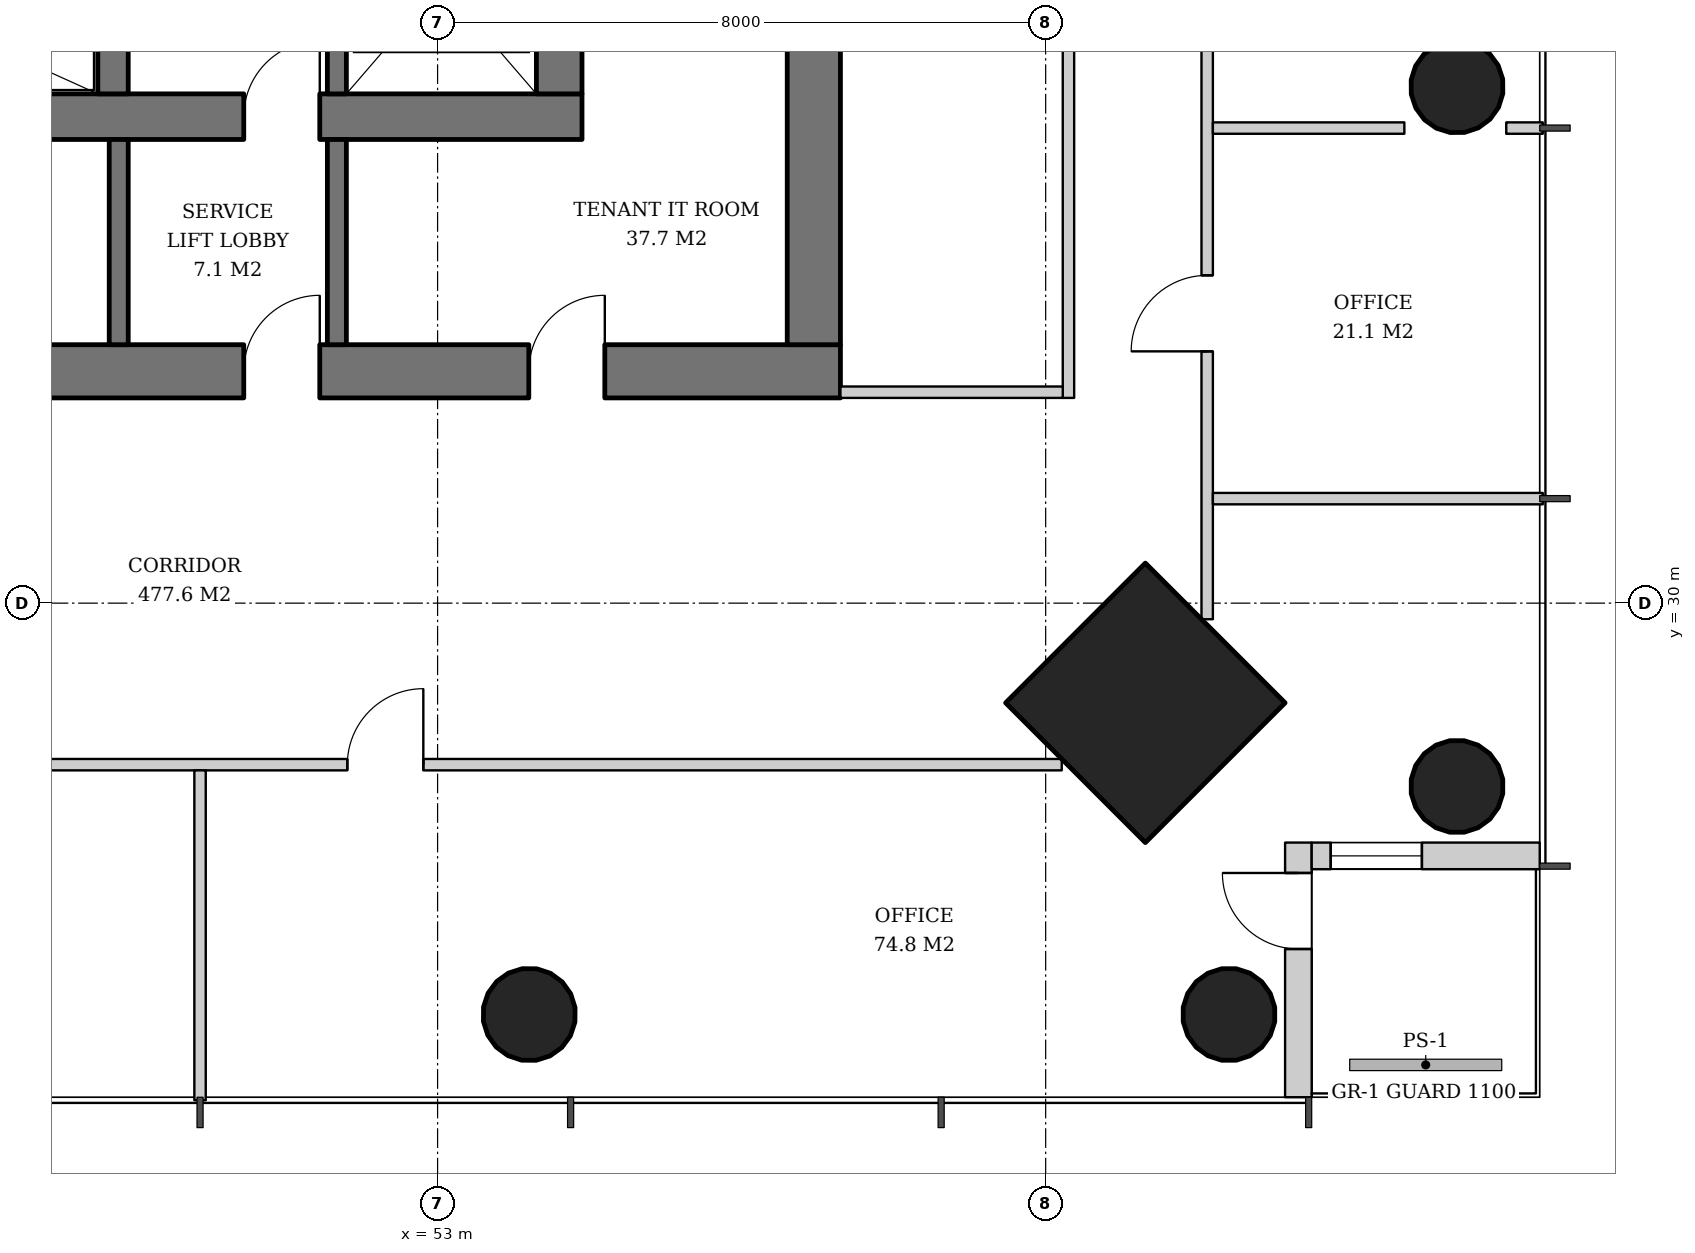
"""IFC4 building model, lengths in metres.
Left out: names, types, materials, properties, quantities, classifications, styles, units other than length and angle.
Written with IfcOpenShell. Run it as: python <this file> out.ifc"""

import sys

from ifc_helpers import new_model, si_unit, direction, frame, frame_2d, origin, origin_2d, place, context, subcontext, project, spatial, rectangle, hollow_circle, extrude, element, fill, save


model = new_model("IFC4")
c1 = context("Model", 3, precision=1e-05, world=origin(), true_north=direction((0.0, 1.0)))
c2 = subcontext(c1, "Body", "Model", "MODEL_VIEW")
j1 = project(units=[si_unit("LENGTHUNIT", "METRE"), si_unit("PLANEANGLEUNIT", "RADIAN")], contexts=[c1])
p1 = place(None, origin())
s1 = spatial("IfcSite", under=j1, at=p1, CompositionType="ELEMENT")
p2 = place(p1, origin())
s2 = spatial("IfcBuilding", under=s1, at=p2, CompositionType="ELEMENT")
p3 = place(p2, frame((0.0, 0.0, 100.8)))
s3 = spatial("IfcBuildingStorey", under=s2, at=p3, CompositionType="ELEMENT", Elevation=100.8)
p4 = place(p3, frame((66.45, 27.55, 0.0), z_axis=(-0.031898107953, 0.031898107953, 0.998981992539), x_axis=(-0.707106781187, -0.707106781187, 0.0)))
e1 = element("IfcColumn", 1, at=p4, inside=s3, PredefinedType="COLUMN", context=c2, shape_type="SweptSolid", body=[
    extrude(hollow_circle(Radius=0.61, WallThickness=0.04, at=origin_2d()), origin(), (0.0, 0.0, 1.0), 3.804),
])
p5 = place(p3, frame((66.45, 36.775, 0.0), z_axis=(-0.031910269556, 0.015987237665, 0.999362868496), x_axis=(-0.447933021895, -0.894067115991, 0.0)))
e2 = element("IfcColumn", 2, at=p5, inside=s3, PredefinedType="COLUMN", context=c2, shape_type="SweptSolid", body=[
    extrude(hollow_circle(Radius=0.61, WallThickness=0.04, at=origin_2d()), origin(), (0.0, 0.0, 1.0), 3.802),
])
p6 = place(p3, frame((62.35, 28.65, 0.0), z_axis=(-0.031962158256, 0.031962158256, 0.998977898093), x_axis=(-0.707106781187, -0.707106781187, 0.0)))
e3 = element("IfcColumn", 3, at=p6, inside=s3, PredefinedType="COLUMN", context=c2, shape_type="SweptSolid", body=[
    extrude(rectangle(XDim=2.6, YDim=2.6, at=origin_2d()), origin(), (0.0, 0.0, 1.0), 3.804),
])
p7 = place(p3, frame((63.45, 24.55, 0.0), z_axis=(-0.031898107953, 0.031898107953, 0.998981992539), x_axis=(-0.707106781187, -0.707106781187, 0.0)))
e4 = element("IfcColumn", 4, at=p7, inside=s3, PredefinedType="COLUMN", context=c2, shape_type="SweptSolid", body=[
    extrude(hollow_circle(Radius=0.61, WallThickness=0.04, at=origin_2d()), origin(), (0.0, 0.0, 1.0), 3.804),
])
p8 = place(p3, frame((54.225, 24.55, 0.0), z_axis=(-0.015987237665, 0.031910269556, 0.999362868496), x_axis=(-0.894067115991, -0.447933021895, 0.0)))
e5 = element("IfcColumn", 5, at=p8, inside=s3, PredefinedType="COLUMN", context=c2, shape_type="SweptSolid", body=[
    extrude(hollow_circle(Radius=0.61, WallThickness=0.04, at=origin_2d()), origin(), (0.0, 0.0, 1.0), 3.802),
])
p9 = place(p3, frame((35.1, 36.4, 0.0), z_axis=(0.0, 0.0, 1.0), x_axis=(1.0, 0.0, 0.0)))
e6 = element("IfcWall", 6, at=p9, inside=s3, PredefinedType="SHEAR", context=c2, shape_type="SweptSolid", body=[
    extrude(rectangle(XDim=19.8, YDim=0.6, at=frame_2d((9.9, 0.0))), origin(), (0.0, 0.0, 1.0), 3.8),
])
p10 = place(p9, frame((3.9, 0.0, 0.0)))
e7 = element("IfcOpeningElement", 7, at=p10, cuts=e6, PredefinedType="OPENING", context=c2, shape_type="SweptSolid", body=[
    extrude(rectangle(XDim=1.0, YDim=2.1, at=frame_2d((0.5, 1.05))), frame((0.0, 0.31, 0.0), z_axis=(0.0, -1.0, 0.0), x_axis=(1.0, 0.0, 0.0)), (0.0, 0.0, 1.0), 0.62),
])
p11 = place(p9, frame((15.35, 0.0, 0.0)))
e8 = element("IfcOpeningElement", 8, at=p11, cuts=e6, PredefinedType="OPENING", context=c2, shape_type="SweptSolid", body=[
    extrude(rectangle(XDim=1.0, YDim=2.1, at=frame_2d((0.5, 1.05))), frame((0.0, 0.31, 0.0), z_axis=(0.0, -1.0, 0.0), x_axis=(1.0, 0.0, 0.0)), (0.0, 0.0, 1.0), 0.62),
])
p12 = place(p3, frame((54.6, 36.7, 0.0), z_axis=(0.0, 0.0, 1.0), x_axis=(0.0, 1.0, 0.0)))
e9 = element("IfcWall", 9, at=p12, inside=s3, PredefinedType="SHEAR", context=c2, shape_type="SweptSolid", body=[
    extrude(rectangle(XDim=18.6, YDim=0.6, at=frame_2d((9.3, 0.0))), origin(), (0.0, 0.0, 1.0), 3.8),
])
p13 = place(p12, frame((8.4, 0.0, 0.0)))
e10 = element("IfcOpeningElement", 10, at=p13, cuts=e9, PredefinedType="OPENING", context=c2, shape_type="SweptSolid", body=[
    extrude(rectangle(XDim=1.8, YDim=2.4, at=frame_2d((0.9, 1.2))), frame((0.0, 0.31, 0.0), z_axis=(0.0, -1.0, 0.0), x_axis=(1.0, 0.0, 0.0)), (0.0, 0.0, 1.0), 0.62),
])
p14 = place(p3, frame((31.7, 33.05, 0.0), z_axis=(0.0, 0.0, 1.0), x_axis=(1.0, 0.0, 0.0)))
e11 = element("IfcWall", 11, at=p14, inside=s3, PredefinedType="SHEAR", context=c2, shape_type="SweptSolid", body=[
    extrude(rectangle(XDim=26.6, YDim=0.7, at=frame_2d((13.3, 0.0))), origin(), (0.0, 0.0, 1.0), 3.8),
])
p15 = place(p14, frame((7.3, 0.0, 0.0)))
e12 = element("IfcOpeningElement", 12, at=p15, cuts=e11, PredefinedType="OPENING", context=c2, shape_type="SweptSolid", body=[
    extrude(rectangle(XDim=1.0, YDim=2.1, at=frame_2d((0.5, 1.05))), frame((0.0, 0.36, 0.0), z_axis=(0.0, -1.0, 0.0), x_axis=(1.0, 0.0, 0.0)), (0.0, 0.0, 1.0), 0.72),
])
p16 = place(p14, frame((18.75, 0.0, 0.0)))
e13 = element("IfcOpeningElement", 13, at=p16, cuts=e11, PredefinedType="OPENING", context=c2, shape_type="SweptSolid", body=[
    extrude(rectangle(XDim=1.0, YDim=2.1, at=frame_2d((0.5, 1.05))), frame((0.0, 0.36, 0.0), z_axis=(0.0, -1.0, 0.0), x_axis=(1.0, 0.0, 0.0)), (0.0, 0.0, 1.0), 0.72),
])
p17 = place(p14, frame((3.2, 0.0, 0.0)))
e14 = element("IfcOpeningElement", 14, at=p17, cuts=e11, PredefinedType="OPENING", context=c2, shape_type="SweptSolid", body=[
    extrude(rectangle(XDim=1.0, YDim=2.1, at=frame_2d((0.5, 1.05))), frame((0.0, 0.36, 0.0), z_axis=(0.0, -1.0, 0.0), x_axis=(1.0, 0.0, 0.0)), (0.0, 0.0, 1.0), 0.72),
])
p18 = place(p14, frame((10.42, 0.0, 0.0)))
e15 = element("IfcOpeningElement", 15, at=p18, cuts=e11, PredefinedType="OPENING", context=c2, shape_type="SweptSolid", body=[
    extrude(rectangle(XDim=1.0, YDim=2.1, at=frame_2d((0.5, 1.05))), frame((0.0, 0.36, 0.0), z_axis=(0.0, -1.0, 0.0), x_axis=(1.0, 0.0, 0.0)), (0.0, 0.0, 1.0), 0.72),
])
p19 = place(p14, frame((14.46, 0.0, 0.0)))
e16 = element("IfcOpeningElement", 16, at=p19, cuts=e11, PredefinedType="OPENING", context=c2, shape_type="SweptSolid", body=[
    extrude(rectangle(XDim=1.0, YDim=2.1, at=frame_2d((0.5, 1.05))), frame((0.0, 0.36, 0.0), z_axis=(0.0, -1.0, 0.0), x_axis=(1.0, 0.0, 0.0)), (0.0, 0.0, 1.0), 0.72),
])
p20 = place(p14, frame((22.5, 0.0, 0.0)))
e17 = element("IfcOpeningElement", 17, at=p20, cuts=e11, PredefinedType="OPENING", context=c2, shape_type="SweptSolid", body=[
    extrude(rectangle(XDim=1.0, YDim=2.1, at=frame_2d((0.5, 1.05))), frame((0.0, 0.36, 0.0), z_axis=(0.0, -1.0, 0.0), x_axis=(1.0, 0.0, 0.0)), (0.0, 0.0, 1.0), 0.72),
])
p21 = place(p3, frame((57.95, 33.4, 0.0), z_axis=(0.0, 0.0, 1.0), x_axis=(0.0, 1.0, 0.0)))
e18 = element("IfcWall", 18, at=p21, inside=s3, PredefinedType="SHEAR", context=c2, shape_type="SweptSolid", body=[
    extrude(rectangle(XDim=25.2, YDim=0.7, at=frame_2d((12.6, 0.0))), origin(), (0.0, 0.0, 1.0), 3.8),
])
p22 = place(p21, frame((11.7, 0.0, 0.0)))
e19 = element("IfcOpeningElement", 19, at=p22, cuts=e18, PredefinedType="OPENING", context=c2, shape_type="SweptSolid", body=[
    extrude(rectangle(XDim=1.8, YDim=2.4, at=frame_2d((0.9, 1.2))), frame((0.0, 0.36, 0.0), z_axis=(0.0, -1.0, 0.0), x_axis=(1.0, 0.0, 0.0)), (0.0, 0.0, 1.0), 0.72),
])
p23 = place(p3, frame((48.73, 36.7, 0.0), z_axis=(0.0, 0.0, 1.0), x_axis=(0.0, 1.0, 0.0)))
e20 = element("IfcWall", 20, at=p23, inside=s3, PredefinedType="SHEAR", context=c2, shape_type="SweptSolid", body=[
    extrude(rectangle(XDim=2.9, YDim=0.4, at=frame_2d((1.45, 0.0))), origin(), (0.0, 0.0, 1.0), 3.8),
])
p24 = place(p3, frame((64.325, 23.5, 0.0), z_axis=(0.0, 0.0, 1.0), x_axis=(0.0, 1.0, 0.0)))
e21 = element("IfcWall", 21, at=p24, inside=s3, PredefinedType="SOLIDWALL", context=c2, shape_type="SweptSolid", body=[
    extrude(rectangle(XDim=3.35, YDim=0.35, at=frame_2d((1.675, 0.0))), origin(), (0.0, 0.0, 1.0), 3.62),
])
p25 = place(p24, frame((1.95, 0.0, 0.0)))
e22 = element("IfcOpeningElement", 22, at=p25, cuts=e21, PredefinedType="OPENING", context=c2, shape_type="SweptSolid", body=[
    extrude(rectangle(XDim=1.0, YDim=2.4, at=frame_2d((0.5, 1.2))), frame((0.0, 0.185, 0.0), z_axis=(0.0, -1.0, 0.0), x_axis=(1.0, 0.0, 0.0)), (0.0, 0.0, 1.0), 0.37),
])
p26 = place(p3, frame((64.5, 26.675, 0.0), z_axis=(0.0, 0.0, 1.0), x_axis=(1.0, 0.0, 0.0)))
e23 = element("IfcWall", 23, at=p26, inside=s3, PredefinedType="SOLIDWALL", context=c2, shape_type="SweptSolid", body=[
    extrude(rectangle(XDim=3.0, YDim=0.35, at=frame_2d((1.5, 0.0))), origin(), (0.0, 0.0, 1.0), 3.62),
])
p27 = place(p26, frame((0.25, 0.0, 0.6)))
e24 = element("IfcOpeningElement", 24, at=p27, cuts=e23, PredefinedType="OPENING", context=c2, shape_type="SweptSolid", body=[
    extrude(rectangle(XDim=1.2, YDim=2.55, at=frame_2d((0.6, 1.275))), frame((0.0, 0.185, 0.0), z_axis=(0.0, -1.0, 0.0), x_axis=(1.0, 0.0, 0.0)), (0.0, 0.0, 1.0), 0.37),
])
p28 = place(p3, frame((51.675, 36.7, 0.0), z_axis=(0.0, 0.0, 1.0), x_axis=(0.0, 1.0, 0.0)))
e25 = element("IfcWall", 25, at=p28, inside=s3, PredefinedType="SHEAR", context=c2, shape_type="SweptSolid", body=[
    extrude(rectangle(XDim=2.9, YDim=0.25, at=frame_2d((1.45, 0.0))), origin(), (0.0, 0.0, 1.0), 3.8),
])
p29 = place(p28, frame((0.75, 0.0, 0.0)))
e26 = element("IfcOpeningElement", 26, at=p29, cuts=e25, PredefinedType="OPENING", context=c2, shape_type="SweptSolid", body=[
    extrude(rectangle(XDim=1.4, YDim=2.4, at=frame_2d((0.7, 1.2))), frame((0.0, 0.135, 0.0), z_axis=(0.0, -1.0, 0.0), x_axis=(1.0, 0.0, 0.0)), (0.0, 0.0, 1.0), 0.27),
])
for number, where, z_axis, x_axis in (
    (27, (48.805, 33.4, 0.0), (0.0, 0.0, 1.0), (0.0, 1.0, 0.0)),
    (28, (51.675, 33.4, 0.0), (0.0, 0.0, 1.0), (0.0, 1.0, 0.0)),
):
    element("IfcWall", number, at=place(p3, frame(where, z_axis=z_axis, x_axis=x_axis)), inside=s3, PredefinedType="SOLIDWALL", context=c2, shape_type="SweptSolid", body=[
        extrude(rectangle(XDim=2.7, YDim=0.25, at=frame_2d((1.35, 0.0))), origin(), (0.0, 0.0, 1.0), 3.62),
    ])
p30 = place(p3, frame((61.3, 32.7, 0.0), z_axis=(0.0, 0.0, 1.0), x_axis=(0.0, 1.0, 0.0)))
e29 = element("IfcWall", 29, at=p30, inside=s3, PredefinedType="PARTITIONING", context=c2, shape_type="SweptSolid", body=[
    extrude(rectangle(XDim=11.275, YDim=0.15, at=frame_2d((5.638, 0.0))), origin(), (0.0, 0.0, 1.0), 2.72),
])
p31 = place(p30, frame((5.137, 0.0, 0.0)))
e30 = element("IfcOpeningElement", 30, at=p31, cuts=e29, PredefinedType="OPENING", context=c2, shape_type="SweptSolid", body=[
    extrude(rectangle(XDim=1.0, YDim=2.1, at=frame_2d((0.5, 1.05))), frame((0.0, 0.085, 0.0), z_axis=(0.0, -1.0, 0.0), x_axis=(1.0, 0.0, 0.0)), (0.0, 0.0, 1.0), 0.17),
])
p32 = place(p3, frame((58.3, 32.775, 0.0), z_axis=(0.0, 0.0, 1.0), x_axis=(1.0, 0.0, 0.0)))
e31 = element("IfcWall", 31, at=p32, inside=s3, PredefinedType="PARTITIONING", context=c2, shape_type="SweptSolid", body=[
    extrude(rectangle(XDim=2.925, YDim=0.15, at=frame_2d((1.462, 0.0))), origin(), (0.0, 0.0, 1.0), 3.62),
])
p33 = place(p3, frame((63.125, 29.789, 0.0), z_axis=(0.0, 0.0, 1.0), x_axis=(0.0, 1.0, 0.0)))
e32 = element("IfcWall", 32, at=p33, inside=s3, PredefinedType="PARTITIONING", context=c2, shape_type="SweptSolid", body=[
    extrude(rectangle(XDim=32.423, YDim=0.15, at=frame_2d((16.211, 0.0))), origin(), (0.0, 0.0, 1.0), 2.72),
])
p34 = place(p33, frame((3.524, 0.0, 0.0)))
e33 = element("IfcOpeningElement", 33, at=p34, cuts=e32, PredefinedType="OPENING", context=c2, shape_type="SweptSolid", body=[
    extrude(rectangle(XDim=1.0, YDim=2.1, at=frame_2d((0.5, 1.05))), frame((0.0, 0.085, 0.0), z_axis=(0.0, -1.0, 0.0), x_axis=(1.0, 0.0, 0.0)), (0.0, 0.0, 1.0), 0.17),
])
p35 = place(p33, frame((8.399, 0.0, 0.0)))
e34 = element("IfcOpeningElement", 34, at=p35, cuts=e32, PredefinedType="OPENING", context=c2, shape_type="SweptSolid", body=[
    extrude(rectangle(XDim=1.0, YDim=2.1, at=frame_2d((0.5, 1.05))), frame((0.0, 0.085, 0.0), z_axis=(0.0, -1.0, 0.0), x_axis=(1.0, 0.0, 0.0)), (0.0, 0.0, 1.0), 0.17),
])
p36 = place(p33, frame((13.274, 0.0, 0.0)))
e35 = element("IfcOpeningElement", 35, at=p36, cuts=e32, PredefinedType="OPENING", context=c2, shape_type="SweptSolid", body=[
    extrude(rectangle(XDim=1.0, YDim=2.1, at=frame_2d((0.5, 1.05))), frame((0.0, 0.085, 0.0), z_axis=(0.0, -1.0, 0.0), x_axis=(1.0, 0.0, 0.0)), (0.0, 0.0, 1.0), 0.17),
])
p37 = place(p33, frame((18.149, 0.0, 0.0)))
e36 = element("IfcOpeningElement", 36, at=p37, cuts=e32, PredefinedType="OPENING", context=c2, shape_type="SweptSolid", body=[
    extrude(rectangle(XDim=1.0, YDim=2.1, at=frame_2d((0.5, 1.05))), frame((0.0, 0.085, 0.0), z_axis=(0.0, -1.0, 0.0), x_axis=(1.0, 0.0, 0.0)), (0.0, 0.0, 1.0), 0.17),
])
p38 = place(p33, frame((23.024, 0.0, 0.0)))
e37 = element("IfcOpeningElement", 37, at=p38, cuts=e32, PredefinedType="OPENING", context=c2, shape_type="SweptSolid", body=[
    extrude(rectangle(XDim=1.0, YDim=2.1, at=frame_2d((0.5, 1.05))), frame((0.0, 0.085, 0.0), z_axis=(0.0, -1.0, 0.0), x_axis=(1.0, 0.0, 0.0)), (0.0, 0.0, 1.0), 0.17),
])
p39 = place(p3, frame((63.2, 31.375, 0.0), z_axis=(0.0, 0.0, 1.0), x_axis=(1.0, 0.0, 0.0)))
e38 = element("IfcWall", 38, at=p39, inside=s3, PredefinedType="PARTITIONING", context=c2, shape_type="SweptSolid", body=[
    extrude(rectangle(XDim=4.34, YDim=0.15, at=frame_2d((2.17, 0.0))), origin(), (0.0, 0.0, 1.0), 2.82),
])
p40 = place(p3, frame((63.2, 36.25, 0.0), z_axis=(0.0, 0.0, 1.0), x_axis=(1.0, 0.0, 0.0)))
e39 = element("IfcWall", 39, at=p40, inside=s3, PredefinedType="PARTITIONING", context=c2, shape_type="SweptSolid", body=[
    extrude(rectangle(XDim=2.519, YDim=0.15, at=frame_2d((1.26, 0.0))), origin(), (0.0, 0.0, 1.0), 3.62),
])
p41 = place(p3, frame((67.06, 36.25, 0.0), z_axis=(0.0, 0.0, 1.0), x_axis=(1.0, 0.0, 0.0)))
e40 = element("IfcWall", 40, at=p41, inside=s3, PredefinedType="PARTITIONING", context=c2, shape_type="SweptSolid", body=[
    extrude(rectangle(XDim=0.48, YDim=0.15, at=frame_2d((0.24, 0.0))), origin(), (0.0, 0.0, 1.0), 3.62),
])
p42 = place(p3, frame((28.789, 27.875, 0.0), z_axis=(0.0, 0.0, 1.0), x_axis=(1.0, 0.0, 0.0)))
e41 = element("IfcWall", 41, at=p42, inside=s3, PredefinedType="PARTITIONING", context=c2, shape_type="SweptSolid", body=[
    extrude(rectangle(XDim=32.423, YDim=0.15, at=frame_2d((16.211, 0.0))), origin(), (0.0, 0.0, 1.0), 2.72),
])
p43 = place(p42, frame((3.524, 0.0, 0.0)))
e42 = element("IfcOpeningElement", 42, at=p43, cuts=e41, PredefinedType="OPENING", context=c2, shape_type="SweptSolid", body=[
    extrude(rectangle(XDim=1.0, YDim=2.1, at=frame_2d((0.5, 1.05))), frame((0.0, 0.085, 0.0), z_axis=(0.0, -1.0, 0.0), x_axis=(1.0, 0.0, 0.0)), (0.0, 0.0, 1.0), 0.17),
])
p44 = place(p42, frame((8.399, 0.0, 0.0)))
e43 = element("IfcOpeningElement", 43, at=p44, cuts=e41, PredefinedType="OPENING", context=c2, shape_type="SweptSolid", body=[
    extrude(rectangle(XDim=1.0, YDim=2.1, at=frame_2d((0.5, 1.05))), frame((0.0, 0.085, 0.0), z_axis=(0.0, -1.0, 0.0), x_axis=(1.0, 0.0, 0.0)), (0.0, 0.0, 1.0), 0.17),
])
p45 = place(p42, frame((13.274, 0.0, 0.0)))
e44 = element("IfcOpeningElement", 44, at=p45, cuts=e41, PredefinedType="OPENING", context=c2, shape_type="SweptSolid", body=[
    extrude(rectangle(XDim=1.0, YDim=2.1, at=frame_2d((0.5, 1.05))), frame((0.0, 0.085, 0.0), z_axis=(0.0, -1.0, 0.0), x_axis=(1.0, 0.0, 0.0)), (0.0, 0.0, 1.0), 0.17),
])
p46 = place(p42, frame((23.024, 0.0, 0.0)))
e45 = element("IfcOpeningElement", 45, at=p46, cuts=e41, PredefinedType="OPENING", context=c2, shape_type="SweptSolid", body=[
    extrude(rectangle(XDim=1.0, YDim=2.1, at=frame_2d((0.5, 1.05))), frame((0.0, 0.085, 0.0), z_axis=(0.0, -1.0, 0.0), x_axis=(1.0, 0.0, 0.0)), (0.0, 0.0, 1.0), 0.17),
])
p47 = place(p3, frame((49.875, 27.8, 0.0), z_axis=(0.0, 0.0, 1.0), x_axis=(0.0, -1.0, 0.0)))
e46 = element("IfcWall", 46, at=p47, inside=s3, PredefinedType="PARTITIONING", context=c2, shape_type="SweptSolid", body=[
    extrude(rectangle(XDim=4.34, YDim=0.15, at=frame_2d((2.17, 0.0))), origin(), (0.0, 0.0, 1.0), 2.82),
])
p48 = place(p25, origin())
e47 = element("IfcDoor", 47, at=p48, inside=s3, OperationType="SINGLE_SWING_RIGHT", PredefinedType="DOOR", context=c2, shape_type="SweptSolid", body=[
    extrude(rectangle(XDim=1.0, YDim=2.4, at=frame_2d((0.5, 1.2))), frame((0.0, 0.025, 0.0), z_axis=(0.0, -1.0, 0.0), x_axis=(1.0, 0.0, 0.0)), (0.0, 0.0, 1.0), 0.05),
])
fill(e22, e47)
p49 = place(p27, origin())
e48 = element("IfcWindow", 48, at=p49, inside=s3, PartitioningType="SINGLE_PANEL", PredefinedType="WINDOW", context=c2, shape_type="SweptSolid", body=[
    extrude(rectangle(XDim=1.2, YDim=2.55, at=frame_2d((0.6, 1.275))), frame((0.0, 0.03, 0.0), z_axis=(0.0, -1.0, 0.0), x_axis=(1.0, 0.0, 0.0)), (0.0, 0.0, 1.0), 0.06),
])
fill(e24, e48)
p50 = place(p11, origin())
e49 = element("IfcDoor", 49, at=p50, inside=s3, OperationType="SINGLE_SWING_RIGHT", PredefinedType="DOOR", context=c2, shape_type="SweptSolid", body=[
    extrude(rectangle(XDim=1.0, YDim=2.1, at=frame_2d((0.5, 1.05))), frame((0.0, 0.025, 0.0), z_axis=(0.0, -1.0, 0.0), x_axis=(1.0, 0.0, 0.0)), (0.0, 0.0, 1.0), 0.05),
])
fill(e8, e49)
p51 = place(p16, origin())
e50 = element("IfcDoor", 50, at=p51, inside=s3, OperationType="SINGLE_SWING_RIGHT", PredefinedType="DOOR", context=c2, shape_type="SweptSolid", body=[
    extrude(rectangle(XDim=1.0, YDim=2.1, at=frame_2d((0.5, 1.05))), frame((0.0, 0.025, 0.0), z_axis=(0.0, -1.0, 0.0), x_axis=(1.0, 0.0, 0.0)), (0.0, 0.0, 1.0), 0.05),
])
fill(e13, e50)
p52 = place(p20, origin())
e51 = element("IfcDoor", 51, at=p52, inside=s3, OperationType="SINGLE_SWING_RIGHT", PredefinedType="DOOR", context=c2, shape_type="SweptSolid", body=[
    extrude(rectangle(XDim=1.0, YDim=2.1, at=frame_2d((0.5, 1.05))), frame((0.0, 0.34, 0.0), z_axis=(0.0, -1.0, 0.0), x_axis=(1.0, 0.0, 0.0)), (0.0, 0.0, 1.0), 0.05),
])
fill(e17, e51)
p53 = place(p34, origin())
e52 = element("IfcDoor", 52, at=p53, inside=s3, OperationType="SINGLE_SWING_LEFT", PredefinedType="DOOR", context=c2, shape_type="SweptSolid", body=[
    extrude(rectangle(XDim=1.0, YDim=2.1, at=frame_2d((0.5, 1.05))), frame((0.0, 0.025, 0.0), z_axis=(0.0, -1.0, 0.0), x_axis=(1.0, 0.0, 0.0)), (0.0, 0.0, 1.0), 0.05),
])
fill(e33, e52)
p54 = place(p46, origin())
e53 = element("IfcDoor", 53, at=p54, inside=s3, OperationType="SINGLE_SWING_RIGHT", PredefinedType="DOOR", context=c2, shape_type="SweptSolid", body=[
    extrude(rectangle(XDim=1.0, YDim=2.1, at=frame_2d((0.5, 1.05))), frame((0.0, 0.025, 0.0), z_axis=(0.0, -1.0, 0.0), x_axis=(1.0, 0.0, 0.0)), (0.0, 0.0, 1.0), 0.05),
])
fill(e45, e53)
save(model, sys.argv[1])
